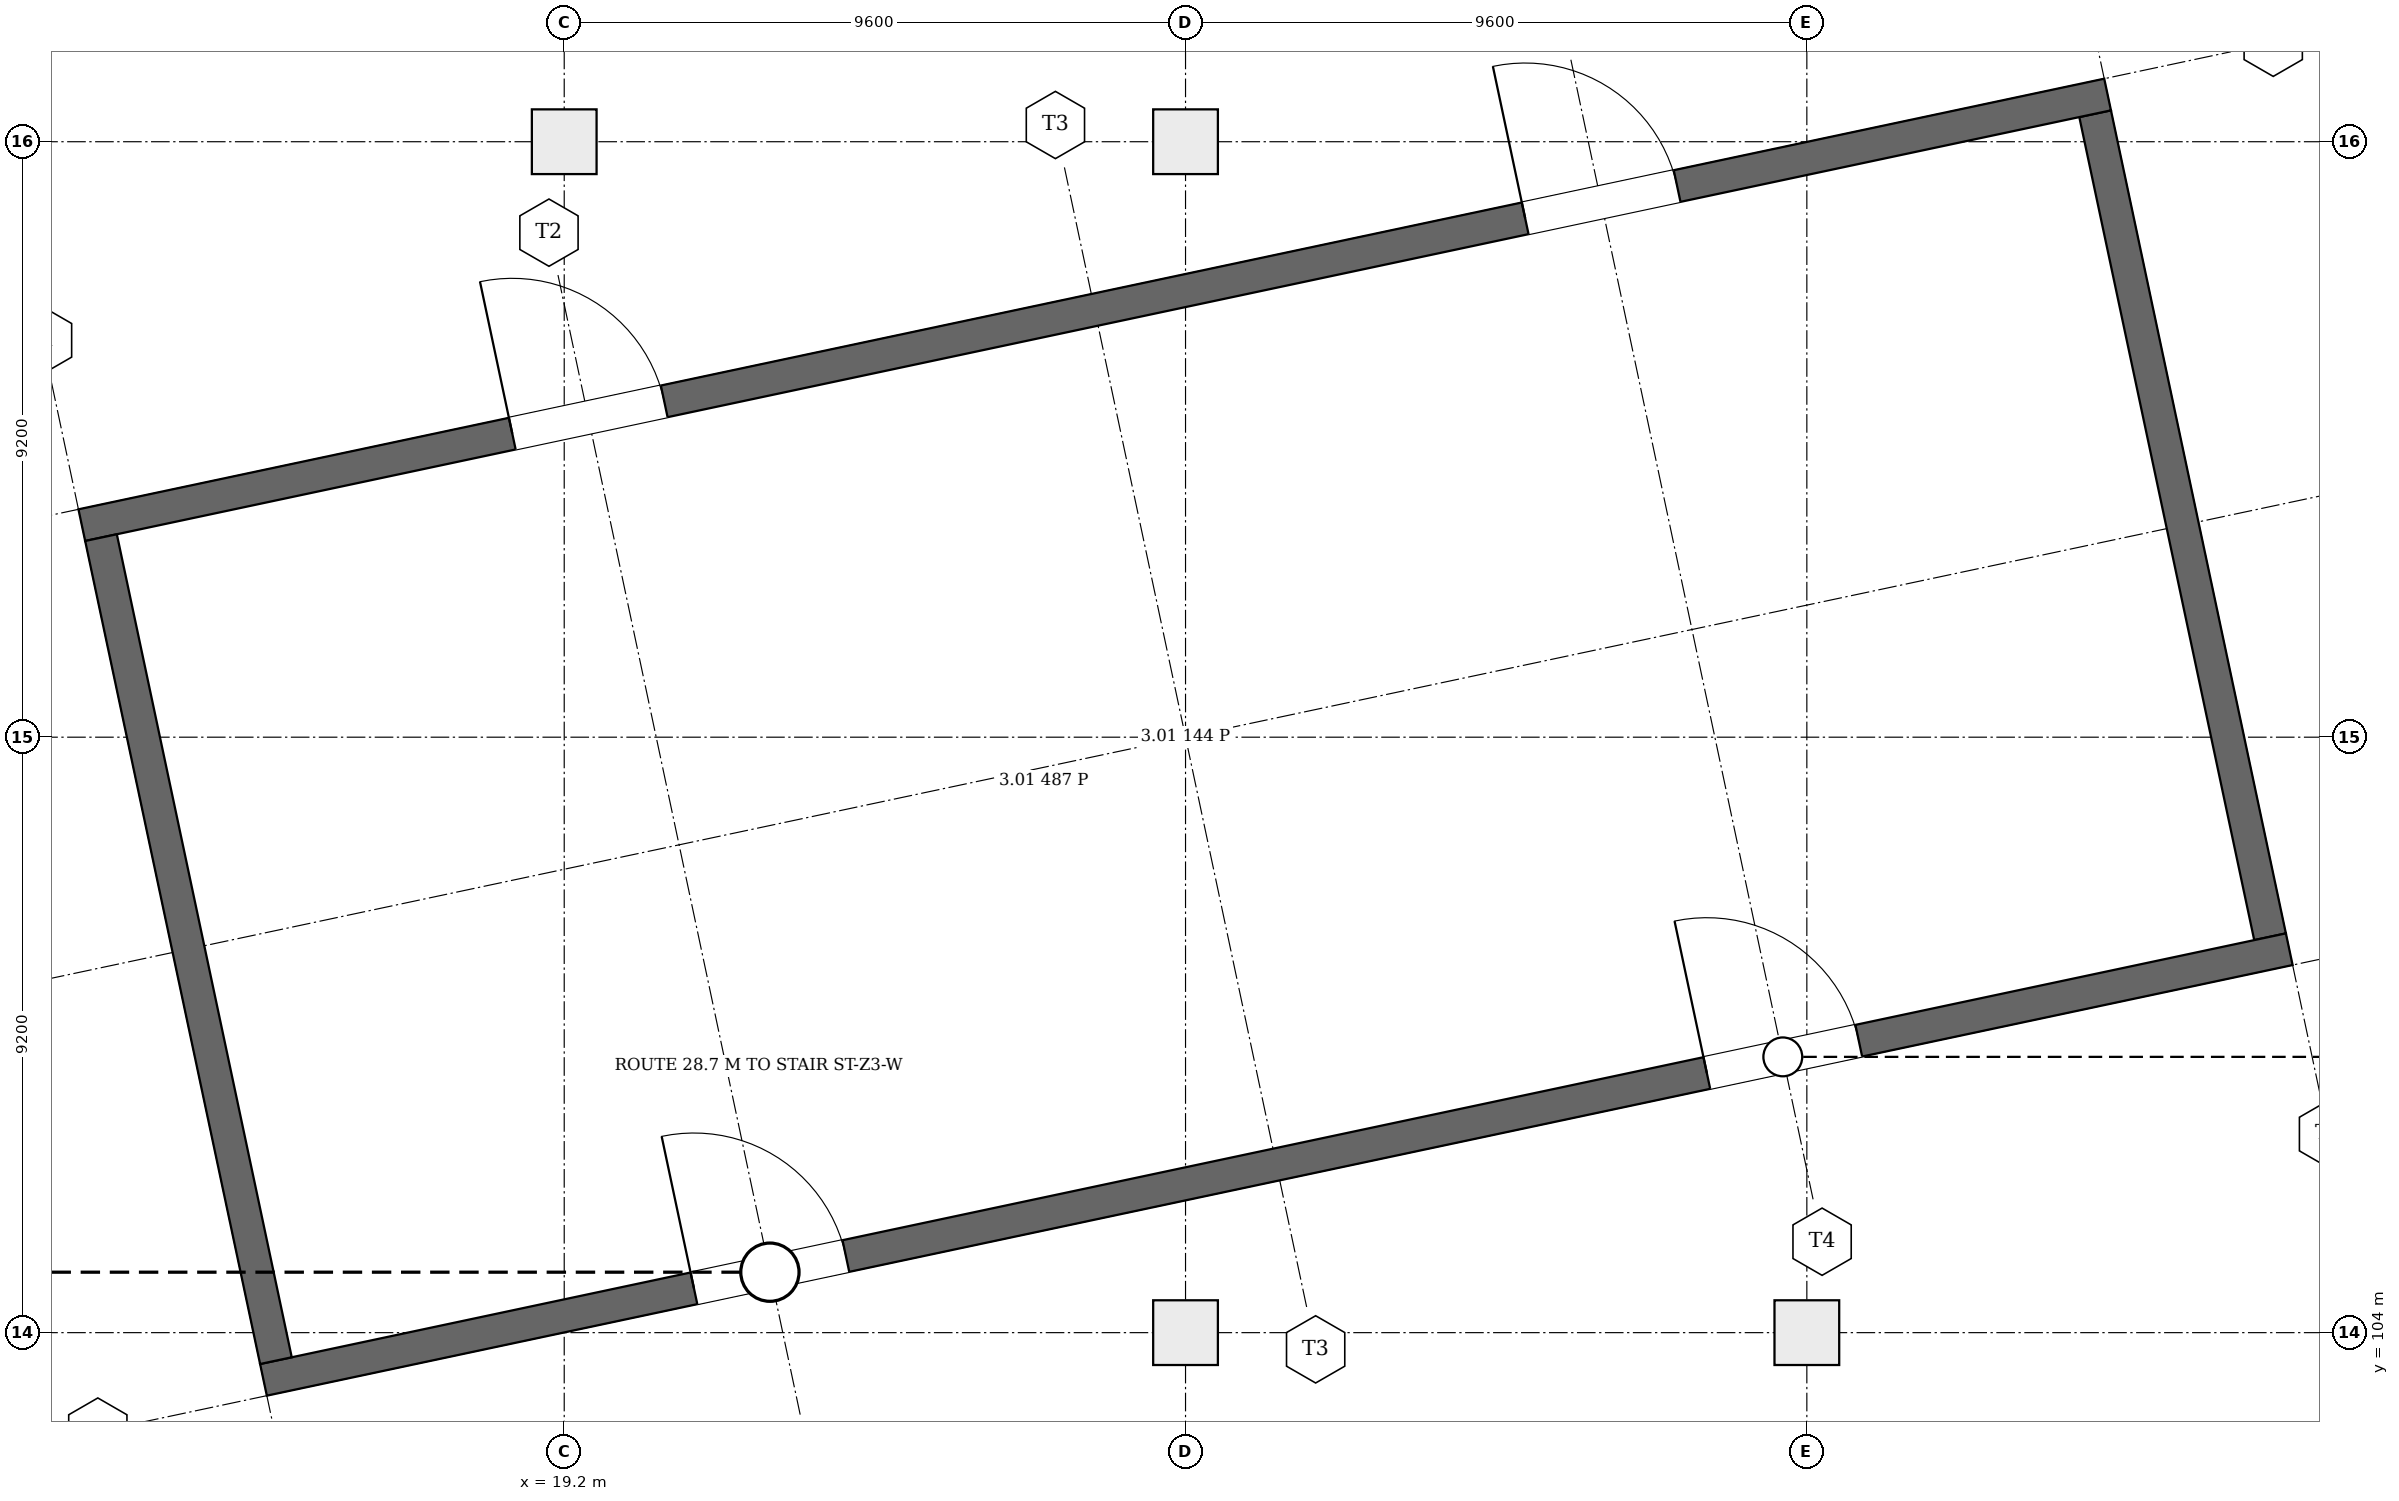
"""IFC4 building model, lengths in metres.
Left out: names, types, materials, properties, quantities, classifications, styles, units other than length and angle.
Written with IfcOpenShell. Run it as: python <this file> out.ifc"""

import sys

from ifc_helpers import new_model, si_unit, direction, frame, frame_2d, origin, origin_2d, place, context, subcontext, project, spatial, rectangle, extrude, element, fill, save


model = new_model("IFC4")
c1 = context("Model", 3, precision=1e-05, world=origin(), true_north=direction((0.0, 1.0)))
c2 = subcontext(c1, "Body", "Model", "MODEL_VIEW")
j1 = project(units=[si_unit("LENGTHUNIT", "METRE"), si_unit("PLANEANGLEUNIT", "RADIAN")], contexts=[c1])
p1 = place(None, origin())
s1 = spatial("IfcSite", under=j1, at=p1, CompositionType="ELEMENT")
p2 = place(p1, origin())
s2 = spatial("IfcBuilding", under=s1, at=p2, CompositionType="ELEMENT")
p3 = place(p2, frame((0.0, 0.0, 21.7)))
s3 = spatial("IfcBuildingStorey", under=s2, at=p3, CompositionType="ELEMENT", Elevation=21.7)
p4 = place(p3, frame((14.553, 103.271, 0.0), z_axis=(0.0, 0.0, 1.0), x_axis=(0.978148301511, 0.207908393895, 0.0)))
e1 = element("IfcWall", 1, at=p4, inside=s3, PredefinedType="SHEAR", context=c2, shape_type="SweptSolid", body=[
    extrude(rectangle(XDim=32.0, YDim=0.5, at=frame_2d((16.0, 0.0))), origin(), (0.0, 0.0, 1.0), 5.0),
])
p5 = place(p4, frame((6.8, 0.0, 0.0)))
e2 = element("IfcOpeningElement", 2, at=p5, cuts=e1, PredefinedType="OPENING", context=c2, shape_type="SweptSolid", body=[
    extrude(rectangle(XDim=2.4, YDim=2.4, at=frame_2d((1.2, 1.2))), frame((0.0, 0.26, 0.0), z_axis=(0.0, -1.0, 0.0), x_axis=(1.0, 0.0, 0.0)), (0.0, 0.0, 1.0), 0.52),
])
p6 = place(p4, frame((22.8, 0.0, 0.0)))
e3 = element("IfcOpeningElement", 3, at=p6, cuts=e1, PredefinedType="OPENING", context=c2, shape_type="SweptSolid", body=[
    extrude(rectangle(XDim=2.4, YDim=2.4, at=frame_2d((1.2, 1.2))), frame((0.0, 0.26, 0.0), z_axis=(0.0, -1.0, 0.0), x_axis=(1.0, 0.0, 0.0)), (0.0, 0.0, 1.0), 0.52),
])
p7 = place(p3, frame((11.746, 116.476, 0.0), z_axis=(0.0, 0.0, 1.0), x_axis=(0.978146420121, 0.207917245089, 0.0)))
e4 = element("IfcWall", 4, at=p7, inside=s3, PredefinedType="SHEAR", context=c2, shape_type="SweptSolid", body=[
    extrude(rectangle(XDim=32.0, YDim=0.5, at=frame_2d((16.0, 0.0))), origin(), (0.0, 0.0, 1.0), 5.0),
])
p8 = place(p7, frame((6.8, 0.0, 0.0)))
e5 = element("IfcOpeningElement", 5, at=p8, cuts=e4, PredefinedType="OPENING", context=c2, shape_type="SweptSolid", body=[
    extrude(rectangle(XDim=2.4, YDim=2.4, at=frame_2d((1.2, 1.2))), frame((0.0, 0.26, 0.0), z_axis=(0.0, -1.0, 0.0), x_axis=(1.0, 0.0, 0.0)), (0.0, 0.0, 1.0), 0.52),
])
p9 = place(p7, frame((22.8, 0.0, 0.0)))
e6 = element("IfcOpeningElement", 6, at=p9, cuts=e4, PredefinedType="OPENING", context=c2, shape_type="SweptSolid", body=[
    extrude(rectangle(XDim=2.4, YDim=2.4, at=frame_2d((1.2, 1.2))), frame((0.0, 0.26, 0.0), z_axis=(0.0, -1.0, 0.0), x_axis=(1.0, 0.0, 0.0)), (0.0, 0.0, 1.0), 0.52),
])
p10 = place(p3, frame((14.746, 103.567, 0.0), z_axis=(0.0, 0.0, 1.0), x_axis=(-0.207911537827, 0.978147633253, 0.0)))
e7 = element("IfcWall", 7, at=p10, inside=s3, PredefinedType="SHEAR", context=c2, shape_type="SweptSolid", body=[
    extrude(rectangle(XDim=13.0, YDim=0.5, at=frame_2d((6.5, 0.0))), origin(), (0.0, 0.0, 1.0), 5.0),
])
p11 = place(p3, frame((45.557, 110.117, 0.0), z_axis=(0.0, 0.0, 1.0), x_axis=(-0.207915357117, 0.978146821431, 0.0)))
e8 = element("IfcWall", 8, at=p11, inside=s3, PredefinedType="SHEAR", context=c2, shape_type="SweptSolid", body=[
    extrude(rectangle(XDim=13.0, YDim=0.5, at=frame_2d((6.5, 0.0))), origin(), (0.0, 0.0, 1.0), 5.0),
])
for number, where, z_axis, x_axis in (
    (9, (28.8, 104.0, 0.0), (0.0, 0.0, 1.0), (1.0, 0.0, 0.0)),
    (10, (38.4, 104.0, 0.0), (0.0, 0.0, 1.0), (1.0, 0.0, 0.0)),
    (11, (19.2, 122.4, 0.0), (0.0, 0.0, 1.0), (1.0, 0.0, 0.0)),
    (12, (28.8, 122.4, 0.0), (0.0, 0.0, 1.0), (1.0, 0.0, 0.0)),
):
    element("IfcColumn", number, at=place(p3, frame(where, z_axis=z_axis, x_axis=x_axis)), inside=s3, PredefinedType="COLUMN", context=c2, shape_type="SweptSolid", body=[
        extrude(rectangle(XDim=1.0, YDim=1.0, at=origin_2d()), origin(), (0.0, 0.0, 1.0), 5.0),
    ])
p12 = place(p5, origin())
e13 = element("IfcDoor", 13, at=p12, inside=s3, OperationType="DOUBLE_DOOR_SINGLE_SWING", PredefinedType="DOOR", context=c2, shape_type="SweptSolid", body=[
    extrude(rectangle(XDim=2.4, YDim=2.4, at=frame_2d((1.2, 1.2))), frame((0.0, 0.025, 0.0), z_axis=(0.0, -1.0, 0.0), x_axis=(1.0, 0.0, 0.0)), (0.0, 0.0, 1.0), 0.05),
])
fill(e2, e13)
p13 = place(p8, origin())
e14 = element("IfcDoor", 14, at=p13, inside=s3, OperationType="DOUBLE_DOOR_SINGLE_SWING", PredefinedType="DOOR", context=c2, shape_type="SweptSolid", body=[
    extrude(rectangle(XDim=2.4, YDim=2.4, at=frame_2d((1.2, 1.2))), frame((0.0, 0.025, 0.0), z_axis=(0.0, -1.0, 0.0), x_axis=(1.0, 0.0, 0.0)), (0.0, 0.0, 1.0), 0.05),
])
fill(e5, e14)
p14 = place(p6, origin())
e15 = element("IfcDoor", 15, at=p14, inside=s3, OperationType="DOUBLE_DOOR_SINGLE_SWING", PredefinedType="DOOR", context=c2, shape_type="SweptSolid", body=[
    extrude(rectangle(XDim=2.4, YDim=2.4, at=frame_2d((1.2, 1.2))), frame((0.0, 0.025, 0.0), z_axis=(0.0, -1.0, 0.0), x_axis=(1.0, 0.0, 0.0)), (0.0, 0.0, 1.0), 0.05),
])
fill(e3, e15)
p15 = place(p9, origin())
e16 = element("IfcDoor", 16, at=p15, inside=s3, OperationType="DOUBLE_DOOR_SINGLE_SWING", PredefinedType="DOOR", context=c2, shape_type="SweptSolid", body=[
    extrude(rectangle(XDim=2.4, YDim=2.4, at=frame_2d((1.2, 1.2))), frame((0.0, 0.025, 0.0), z_axis=(0.0, -1.0, 0.0), x_axis=(1.0, 0.0, 0.0)), (0.0, 0.0, 1.0), 0.05),
])
fill(e6, e16)
save(model, sys.argv[1])
